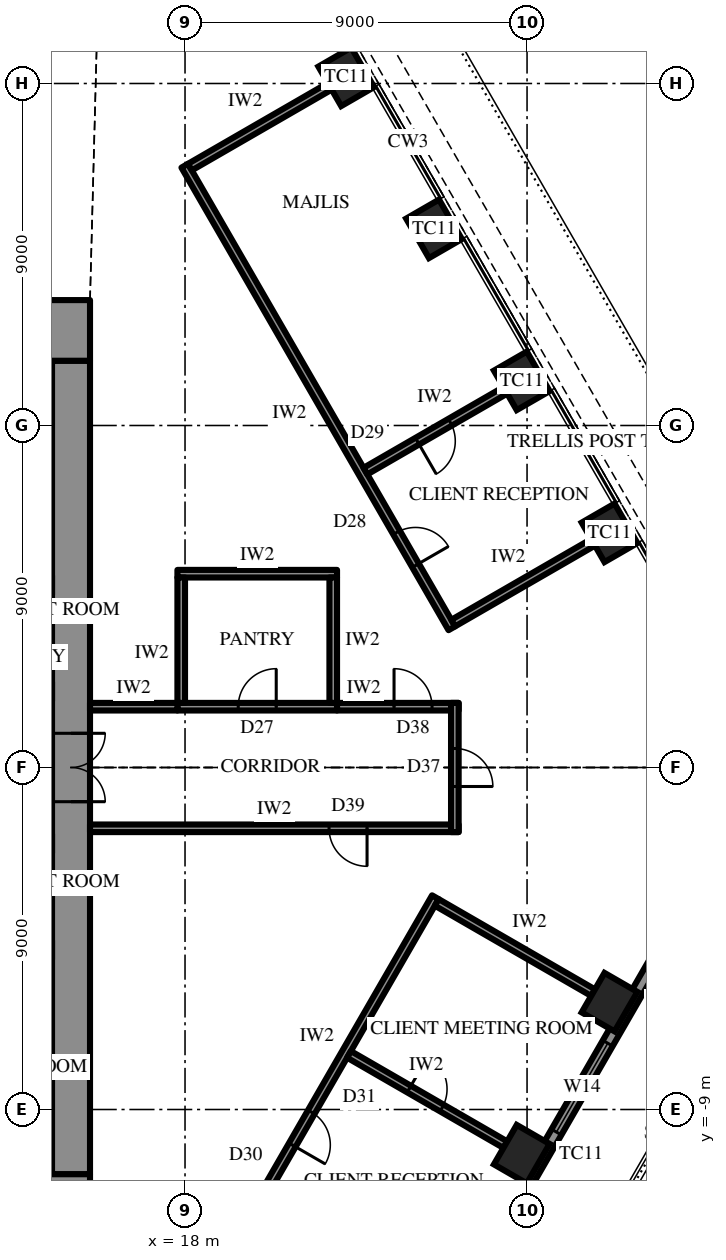
"""IFC4 building model, lengths in metres.
Left out: names, types, materials, properties, quantities, classifications, styles, units other than length and angle.
Written with IfcOpenShell. Run it as: python <this file> out.ifc"""

import sys

from ifc_helpers import new_model, si_unit, direction, frame, frame_2d, origin, origin_2d, place, context, subcontext, project, spatial, rectangle, extrude, element, fill, save


model = new_model("IFC4")
c1 = context("Model", 3, precision=1e-05, world=origin(), true_north=direction((0.0, 1.0)))
c2 = subcontext(c1, "Body", "Model", "MODEL_VIEW")
j1 = project(units=[si_unit("LENGTHUNIT", "METRE"), si_unit("PLANEANGLEUNIT", "RADIAN")], contexts=[c1])
p1 = place(None, origin())
s1 = spatial("IfcSite", under=j1, at=p1, CompositionType="ELEMENT")
p2 = place(p1, origin())
s2 = spatial("IfcBuilding", under=s1, at=p2, CompositionType="ELEMENT")
p3 = place(p2, frame((0.0, 0.0, 265.9)))
s3 = spatial("IfcBuildingStorey", under=s2, at=p3, CompositionType="ELEMENT", Elevation=265.9)
for number, where, z_axis, x_axis in (
    (1, (29.171, 6.175, 0.0), (0.0, 0.0, 1.0), (-0.5, 0.866, 0.0)),
    (2, (26.861, 10.175, 0.0), (0.0, 0.0, 1.0), (-0.5, 0.866, 0.0)),
    (3, (24.552, 14.175, 0.0), (0.0, 0.0, 1.0), (-0.5, 0.866, 0.0)),
    (4, (22.242, 18.175, 0.0), (0.0, 0.0, 1.0), (-0.5, 0.866, 0.0)),
    (5, (26.861, -10.175, 0.0), (0.0, 0.0, 1.0), (0.5, 0.866, 0.0)),
    (6, (29.171, -6.175, 0.0), (0.0, 0.0, 1.0), (0.5, 0.866, 0.0)),
):
    element("IfcColumn", number, at=place(p3, frame(where, z_axis=z_axis, x_axis=x_axis)), inside=s3, PredefinedType="COLUMN", context=c2, shape_type="SweptSolid", body=[
        extrude(rectangle(XDim=1.2, YDim=1.0, at=origin_2d()), origin(), (0.0, 0.0, 1.0), 4.2),
    ])
p4 = place(p3, frame((-15.5, 11.5, 0.0), z_axis=(0.0, 0.0, 1.0), x_axis=(1.0, 0.0, 0.0)))
e7 = element("IfcWall", 7, at=p4, inside=s3, PredefinedType="SHEAR", context=c2, shape_type="SweptSolid", body=[
    extrude(rectangle(XDim=31.0, YDim=1.6, at=frame_2d((15.5, 0.0))), origin(), (0.0, 0.0, 1.0), 4.2),
])
p5 = place(p4, frame((16.35, 0.0, 0.0)))
e8 = element("IfcOpeningElement", 8, at=p5, cuts=e7, PredefinedType="OPENING", context=c2, shape_type="SweptSolid", body=[
    extrude(rectangle(XDim=0.9, YDim=2.2, at=frame_2d((0.45, 1.1))), frame((0.0, 0.81, 0.0), z_axis=(0.0, -1.0, 0.0), x_axis=(1.0, 0.0, 0.0)), (0.0, 0.0, 1.0), 1.62),
])
p6 = place(p4, frame((19.35, 0.0, 0.0)))
e9 = element("IfcOpeningElement", 9, at=p6, cuts=e7, PredefinedType="OPENING", context=c2, shape_type="SweptSolid", body=[
    extrude(rectangle(XDim=0.9, YDim=2.2, at=frame_2d((0.45, 1.1))), frame((0.0, 0.81, 0.0), z_axis=(0.0, -1.0, 0.0), x_axis=(1.0, 0.0, 0.0)), (0.0, 0.0, 1.0), 1.62),
])
p7 = place(p4, frame((22.4, 0.0, 0.0)))
e10 = element("IfcOpeningElement", 10, at=p7, cuts=e7, PredefinedType="OPENING", context=c2, shape_type="SweptSolid", body=[
    extrude(rectangle(XDim=1.0, YDim=2.2, at=frame_2d((0.5, 1.1))), frame((0.0, 0.81, 0.0), z_axis=(0.0, -1.0, 0.0), x_axis=(1.0, 0.0, 0.0)), (0.0, 0.0, 1.0), 1.62),
])
p8 = place(p4, frame((1.65, 0.0, 0.0)))
e11 = element("IfcOpeningElement", 11, at=p8, cuts=e7, PredefinedType="OPENING", context=c2, shape_type="SweptSolid", body=[
    extrude(rectangle(XDim=0.9, YDim=2.2, at=frame_2d((0.45, 1.1))), frame((0.0, 0.81, 0.0), z_axis=(0.0, -1.0, 0.0), x_axis=(1.0, 0.0, 0.0)), (0.0, 0.0, 1.0), 1.62),
])
p9 = place(p4, frame((4.65, 0.0, 0.0)))
e12 = element("IfcOpeningElement", 12, at=p9, cuts=e7, PredefinedType="OPENING", context=c2, shape_type="SweptSolid", body=[
    extrude(rectangle(XDim=0.9, YDim=2.2, at=frame_2d((0.45, 1.1))), frame((0.0, 0.81, 0.0), z_axis=(0.0, -1.0, 0.0), x_axis=(1.0, 0.0, 0.0)), (0.0, 0.0, 1.0), 1.62),
])
p10 = place(p4, frame((25.45, 0.0, 0.0)))
e13 = element("IfcOpeningElement", 13, at=p10, cuts=e7, PredefinedType="OPENING", context=c2, shape_type="SweptSolid", body=[
    extrude(rectangle(XDim=0.9, YDim=2.2, at=frame_2d((0.45, 1.1))), frame((0.0, 0.81, 0.0), z_axis=(0.0, -1.0, 0.0), x_axis=(1.0, 0.0, 0.0)), (0.0, 0.0, 1.0), 1.62),
])
p11 = place(p4, frame((28.45, 0.0, 0.0)))
e14 = element("IfcOpeningElement", 14, at=p11, cuts=e7, PredefinedType="OPENING", context=c2, shape_type="SweptSolid", body=[
    extrude(rectangle(XDim=0.9, YDim=2.2, at=frame_2d((0.45, 1.1))), frame((0.0, 0.81, 0.0), z_axis=(0.0, -1.0, 0.0), x_axis=(1.0, 0.0, 0.0)), (0.0, 0.0, 1.0), 1.62),
])
p12 = place(p3, frame((15.5, -11.5, 0.0), z_axis=(0.0, 0.0, 1.0), x_axis=(-1.0, 0.0, 0.0)))
e15 = element("IfcWall", 15, at=p12, inside=s3, PredefinedType="SHEAR", context=c2, shape_type="SweptSolid", body=[
    extrude(rectangle(XDim=31.0, YDim=1.6, at=frame_2d((15.5, 0.0))), origin(), (0.0, 0.0, 1.0), 4.2),
])
p13 = place(p12, frame((16.35, 0.0, 0.0)))
e16 = element("IfcOpeningElement", 16, at=p13, cuts=e15, PredefinedType="OPENING", context=c2, shape_type="SweptSolid", body=[
    extrude(rectangle(XDim=0.9, YDim=2.2, at=frame_2d((0.45, 1.1))), frame((0.0, 0.81, 0.0), z_axis=(0.0, -1.0, 0.0), x_axis=(1.0, 0.0, 0.0)), (0.0, 0.0, 1.0), 1.62),
])
p14 = place(p12, frame((19.35, 0.0, 0.0)))
e17 = element("IfcOpeningElement", 17, at=p14, cuts=e15, PredefinedType="OPENING", context=c2, shape_type="SweptSolid", body=[
    extrude(rectangle(XDim=0.9, YDim=2.2, at=frame_2d((0.45, 1.1))), frame((0.0, 0.81, 0.0), z_axis=(0.0, -1.0, 0.0), x_axis=(1.0, 0.0, 0.0)), (0.0, 0.0, 1.0), 1.62),
])
p15 = place(p12, frame((22.4, 0.0, 0.0)))
e18 = element("IfcOpeningElement", 18, at=p15, cuts=e15, PredefinedType="OPENING", context=c2, shape_type="SweptSolid", body=[
    extrude(rectangle(XDim=1.0, YDim=2.2, at=frame_2d((0.5, 1.1))), frame((0.0, 0.81, 0.0), z_axis=(0.0, -1.0, 0.0), x_axis=(1.0, 0.0, 0.0)), (0.0, 0.0, 1.0), 1.62),
])
p16 = place(p12, frame((1.65, 0.0, 0.0)))
e19 = element("IfcOpeningElement", 19, at=p16, cuts=e15, PredefinedType="OPENING", context=c2, shape_type="SweptSolid", body=[
    extrude(rectangle(XDim=0.9, YDim=2.2, at=frame_2d((0.45, 1.1))), frame((0.0, 0.81, 0.0), z_axis=(0.0, -1.0, 0.0), x_axis=(1.0, 0.0, 0.0)), (0.0, 0.0, 1.0), 1.62),
])
p17 = place(p12, frame((4.65, 0.0, 0.0)))
e20 = element("IfcOpeningElement", 20, at=p17, cuts=e15, PredefinedType="OPENING", context=c2, shape_type="SweptSolid", body=[
    extrude(rectangle(XDim=0.9, YDim=2.2, at=frame_2d((0.45, 1.1))), frame((0.0, 0.81, 0.0), z_axis=(0.0, -1.0, 0.0), x_axis=(1.0, 0.0, 0.0)), (0.0, 0.0, 1.0), 1.62),
])
p18 = place(p12, frame((25.45, 0.0, 0.0)))
e21 = element("IfcOpeningElement", 21, at=p18, cuts=e15, PredefinedType="OPENING", context=c2, shape_type="SweptSolid", body=[
    extrude(rectangle(XDim=0.9, YDim=2.2, at=frame_2d((0.45, 1.1))), frame((0.0, 0.81, 0.0), z_axis=(0.0, -1.0, 0.0), x_axis=(1.0, 0.0, 0.0)), (0.0, 0.0, 1.0), 1.62),
])
p19 = place(p12, frame((28.45, 0.0, 0.0)))
e22 = element("IfcOpeningElement", 22, at=p19, cuts=e15, PredefinedType="OPENING", context=c2, shape_type="SweptSolid", body=[
    extrude(rectangle(XDim=0.9, YDim=2.2, at=frame_2d((0.45, 1.1))), frame((0.0, 0.81, 0.0), z_axis=(0.0, -1.0, 0.0), x_axis=(1.0, 0.0, 0.0)), (0.0, 0.0, 1.0), 1.62),
])
p20 = place(p3, frame((15.0, -10.7, 0.0), z_axis=(0.0, 0.0, 1.0), x_axis=(0.0, 1.0, 0.0)))
e23 = element("IfcWall", 23, at=p20, inside=s3, PredefinedType="SHEAR", context=c2, shape_type="SweptSolid", body=[
    extrude(rectangle(XDim=21.4, YDim=1.0, at=frame_2d((10.7, 0.0))), origin(), (0.0, 0.0, 1.0), 4.2),
])
p21 = place(p20, frame((9.8, 0.0, 0.0)))
e24 = element("IfcOpeningElement", 24, at=p21, cuts=e23, PredefinedType="OPENING", context=c2, shape_type="SweptSolid", body=[
    extrude(rectangle(XDim=1.8, YDim=2.4, at=frame_2d((0.9, 1.2))), frame((0.0, 0.51, 0.0), z_axis=(0.0, -1.0, 0.0), x_axis=(1.0, 0.0, 0.0)), (0.0, 0.0, 1.0), 1.02),
])
p22 = place(p3, frame((12.3, 2.0, 0.0), z_axis=(0.0, 0.0, 1.0), x_axis=(1.0, 0.0, 0.0)))
e25 = element("IfcWall", 25, at=p22, inside=s3, PredefinedType="SHEAR", context=c2, shape_type="SweptSolid", body=[
    extrude(rectangle(XDim=2.2, YDim=0.5, at=frame_2d((1.1, 0.0))), origin(), (0.0, 0.0, 1.0), 4.2),
])
p23 = place(p22, frame((0.8, 0.0, 0.0)))
e26 = element("IfcOpeningElement", 26, at=p23, cuts=e25, PredefinedType="OPENING", context=c2, shape_type="SweptSolid", body=[
    extrude(rectangle(XDim=0.9, YDim=2.2, at=frame_2d((0.45, 1.1))), frame((0.0, 0.26, 0.0), z_axis=(0.0, -1.0, 0.0), x_axis=(1.0, 0.0, 0.0)), (0.0, 0.0, 1.0), 0.52),
])
p24 = place(p3, frame((12.3, 4.8, 0.0), z_axis=(0.0, 0.0, 1.0), x_axis=(1.0, 0.0, 0.0)))
e27 = element("IfcWall", 27, at=p24, inside=s3, PredefinedType="SHEAR", context=c2, shape_type="SweptSolid", body=[
    extrude(rectangle(XDim=2.2, YDim=0.5, at=frame_2d((1.1, 0.0))), origin(), (0.0, 0.0, 1.0), 4.2),
])
p25 = place(p3, frame((18.707, -25.299, 0.0), z_axis=(0.0, 0.0, 1.0), x_axis=(0.500000442367, 0.866025148383, 0.0)))
e28 = element("IfcWall", 28, at=p25, inside=s3, PredefinedType="SOLIDWALL", context=c2, shape_type="SweptSolid", body=[
    extrude(rectangle(XDim=25.113, YDim=0.3, at=frame_2d((12.556, 0.0))), origin(), (0.0, 0.0, 1.0), 2.8),
])
p26 = place(p25, frame((4.278, 0.0, 0.6)))
e29 = element("IfcOpeningElement", 29, at=p26, cuts=e28, PredefinedType="OPENING", context=c2, shape_type="SweptSolid", body=[
    extrude(rectangle(XDim=2.7, YDim=1.95, at=frame_2d((1.35, 0.975))), frame((0.0, 0.16, 0.0), z_axis=(0.0, -1.0, 0.0), x_axis=(1.0, 0.0, 0.0)), (0.0, 0.0, 1.0), 0.32),
])
p27 = place(p25, frame((9.647, 0.0, 0.0)))
e30 = element("IfcOpeningElement", 30, at=p27, cuts=e28, PredefinedType="OPENING", context=c2, shape_type="SweptSolid", body=[
    extrude(rectangle(XDim=1.2, YDim=2.4, at=frame_2d((0.6, 1.2))), frame((0.0, 0.16, 0.0), z_axis=(0.0, -1.0, 0.0), x_axis=(1.0, 0.0, 0.0)), (0.0, 0.0, 1.0), 0.32),
])
p28 = place(p25, frame((13.516, 0.0, 0.6)))
e31 = element("IfcOpeningElement", 31, at=p28, cuts=e28, PredefinedType="OPENING", context=c2, shape_type="SweptSolid", body=[
    extrude(rectangle(XDim=2.7, YDim=1.95, at=frame_2d((1.35, 0.975))), frame((0.0, 0.16, 0.0), z_axis=(0.0, -1.0, 0.0), x_axis=(1.0, 0.0, 0.0)), (0.0, 0.0, 1.0), 0.32),
])
p29 = place(p25, frame((18.135, 0.0, 0.6)))
e32 = element("IfcOpeningElement", 32, at=p29, cuts=e28, PredefinedType="OPENING", context=c2, shape_type="SweptSolid", body=[
    extrude(rectangle(XDim=2.7, YDim=1.95, at=frame_2d((1.35, 0.975))), frame((0.0, 0.16, 0.0), z_axis=(0.0, -1.0, 0.0), x_axis=(1.0, 0.0, 0.0)), (0.0, 0.0, 1.0), 0.32),
])
p30 = place(p3, frame((25.021, 3.663, 0.0), z_axis=(0.0, 0.0, 1.0), x_axis=(-0.500002095642, 0.866024193862, 0.0)))
e33 = element("IfcWall", 33, at=p30, inside=s3, PredefinedType="PARTITIONING", context=c2, shape_type="SweptSolid", body=[
    extrude(rectangle(XDim=14.057, YDim=0.2, at=frame_2d((7.028, 0.0))), origin(), (0.0, 0.0, 1.0), 4.0),
])
p31 = place(p30, frame((1.909, 0.0, 0.0)))
e34 = element("IfcOpeningElement", 34, at=p31, cuts=e33, PredefinedType="OPENING", context=c2, shape_type="SweptSolid", body=[
    extrude(rectangle(XDim=1.0, YDim=2.2, at=frame_2d((0.5, 1.1))), frame((0.0, 0.11, 0.0), z_axis=(0.0, -1.0, 0.0), x_axis=(1.0, 0.0, 0.0)), (0.0, 0.0, 1.0), 0.22),
])
p32 = place(p3, frame((25.057, 3.8, 0.0), z_axis=(0.0, 0.0, 1.0), x_axis=(0.866028703517, 0.499994284652, 0.0)))
e35 = element("IfcWall", 35, at=p32, inside=s3, PredefinedType="PARTITIONING", context=c2, shape_type="SweptSolid", body=[
    extrude(rectangle(XDim=4.25, YDim=0.2, at=frame_2d((2.125, 0.0))), origin(), (0.0, 0.0, 1.0), 3.082),
])
p33 = place(p3, frame((22.748, 7.8, 0.0), z_axis=(0.0, 0.0, 1.0), x_axis=(0.866028703517, 0.499994284652, 0.0)))
e36 = element("IfcWall", 36, at=p33, inside=s3, PredefinedType="PARTITIONING", context=c2, shape_type="SweptSolid", body=[
    extrude(rectangle(XDim=4.25, YDim=0.2, at=frame_2d((2.125, 0.0))), origin(), (0.0, 0.0, 1.0), 3.082),
])
p34 = place(p33, frame((1.575, 0.0, 0.0)))
e37 = element("IfcOpeningElement", 37, at=p34, cuts=e36, PredefinedType="OPENING", context=c2, shape_type="SweptSolid", body=[
    extrude(rectangle(XDim=1.0, YDim=2.2, at=frame_2d((0.5, 1.1))), frame((0.0, 0.11, 0.0), z_axis=(0.0, -1.0, 0.0), x_axis=(1.0, 0.0, 0.0)), (0.0, 0.0, 1.0), 0.22),
])
p35 = place(p3, frame((18.129, 15.8, 0.0), z_axis=(0.0, 0.0, 1.0), x_axis=(0.866014341725, 0.50001915956, 0.0)))
e38 = element("IfcWall", 38, at=p35, inside=s3, PredefinedType="PARTITIONING", context=c2, shape_type="SweptSolid", body=[
    extrude(rectangle(XDim=4.25, YDim=0.2, at=frame_2d((2.125, 0.0))), origin(), (0.0, 0.0, 1.0), 3.082),
])
p36 = place(p3, frame((19.869, -11.587, 0.0), z_axis=(0.0, 0.0, 1.0), x_axis=(0.499989672313, 0.866031366395, 0.0)))
e39 = element("IfcWall", 39, at=p36, inside=s3, PredefinedType="PARTITIONING", context=c2, shape_type="SweptSolid", body=[
    extrude(rectangle(XDim=9.438, YDim=0.2, at=frame_2d((4.719, 0.0))), origin(), (0.0, 0.0, 1.0), 4.0),
])
p37 = place(p36, frame((1.909, 0.0, 0.0)))
e40 = element("IfcOpeningElement", 40, at=p37, cuts=e39, PredefinedType="OPENING", context=c2, shape_type="SweptSolid", body=[
    extrude(rectangle(XDim=1.0, YDim=2.2, at=frame_2d((0.5, 1.1))), frame((0.0, 0.11, 0.0), z_axis=(0.0, -1.0, 0.0), x_axis=(1.0, 0.0, 0.0)), (0.0, 0.0, 1.0), 0.22),
])
p38 = place(p3, frame((22.315, -7.55, 0.0), z_axis=(0.0, 0.0, 1.0), x_axis=(0.866020389056, -0.500008685663, 0.0)))
e41 = element("IfcWall", 41, at=p38, inside=s3, PredefinedType="PARTITIONING", context=c2, shape_type="SweptSolid", body=[
    extrude(rectangle(XDim=4.75, YDim=0.2, at=frame_2d((2.375, 0.0))), origin(), (0.0, 0.0, 1.0), 3.082),
])
p39 = place(p38, frame((1.825, 0.0, 0.0)))
e42 = element("IfcOpeningElement", 42, at=p39, cuts=e41, PredefinedType="OPENING", context=c2, shape_type="SweptSolid", body=[
    extrude(rectangle(XDim=1.0, YDim=2.2, at=frame_2d((0.5, 1.1))), frame((0.0, 0.11, 0.0), z_axis=(0.0, -1.0, 0.0), x_axis=(1.0, 0.0, 0.0)), (0.0, 0.0, 1.0), 0.22),
])
p40 = place(p3, frame((24.624, -3.55, 0.0), z_axis=(0.0, 0.0, 1.0), x_axis=(0.866020389056, -0.500008685663, 0.0)))
e43 = element("IfcWall", 43, at=p40, inside=s3, PredefinedType="PARTITIONING", context=c2, shape_type="SweptSolid", body=[
    extrude(rectangle(XDim=4.75, YDim=0.2, at=frame_2d((2.375, 0.0))), origin(), (0.0, 0.0, 1.0), 3.082),
])
p41 = place(p3, frame((17.8, 1.6, 0.0), z_axis=(0.0, 0.0, 1.0), x_axis=(1.0, 0.0, 0.0)))
e44 = element("IfcWall", 44, at=p41, inside=s3, PredefinedType="PARTITIONING", context=c2, shape_type="SweptSolid", body=[
    extrude(rectangle(XDim=4.2, YDim=0.2, at=frame_2d((2.1, 0.0))), origin(), (0.0, 0.0, 1.0), 4.0),
])
p42 = place(p41, frame((1.6, 0.0, 0.0)))
e45 = element("IfcOpeningElement", 45, at=p42, cuts=e44, PredefinedType="OPENING", context=c2, shape_type="SweptSolid", body=[
    extrude(rectangle(XDim=1.0, YDim=2.2, at=frame_2d((0.5, 1.1))), frame((0.0, 0.11, 0.0), z_axis=(0.0, -1.0, 0.0), x_axis=(1.0, 0.0, 0.0)), (0.0, 0.0, 1.0), 0.22),
])
p43 = place(p3, frame((17.8, 5.1, 0.0), z_axis=(0.0, 0.0, 1.0), x_axis=(1.0, 0.0, 0.0)))
e46 = element("IfcWall", 46, at=p43, inside=s3, PredefinedType="PARTITIONING", context=c2, shape_type="SweptSolid", body=[
    extrude(rectangle(XDim=4.2, YDim=0.2, at=frame_2d((2.1, 0.0))), origin(), (0.0, 0.0, 1.0), 4.0),
])
for number, where, z_axis, x_axis in (
    (47, (17.9, 1.7, 0.0), (0.0, 0.0, 1.0), (0.0, 1.0, 0.0)),
    (48, (21.9, 1.7, 0.0), (0.0, 0.0, 1.0), (0.0, 1.0, 0.0)),
):
    element("IfcWall", number, at=place(p3, frame(where, z_axis=z_axis, x_axis=x_axis)), inside=s3, PredefinedType="PARTITIONING", context=c2, shape_type="SweptSolid", body=[
        extrude(rectangle(XDim=3.3, YDim=0.2, at=frame_2d((1.65, 0.0))), origin(), (0.0, 0.0, 1.0), 4.0),
    ])
p44 = place(p3, frame((15.5, 1.6, 0.0), z_axis=(0.0, 0.0, 1.0), x_axis=(1.0, 0.0, 0.0)))
e49 = element("IfcWall", 49, at=p44, inside=s3, PredefinedType="PARTITIONING", context=c2, shape_type="SweptSolid", body=[
    extrude(rectangle(XDim=2.3, YDim=0.2, at=frame_2d((1.15, 0.0))), origin(), (0.0, 0.0, 1.0), 4.0),
])
p45 = place(p3, frame((22.0, 1.6, 0.0), z_axis=(0.0, 0.0, 1.0), x_axis=(1.0, 0.0, 0.0)))
e50 = element("IfcWall", 50, at=p45, inside=s3, PredefinedType="PARTITIONING", context=c2, shape_type="SweptSolid", body=[
    extrude(rectangle(XDim=3.2, YDim=0.2, at=frame_2d((1.6, 0.0))), origin(), (0.0, 0.0, 1.0), 4.0),
])
p46 = place(p45, frame((1.5, 0.0, 0.0)))
e51 = element("IfcOpeningElement", 51, at=p46, cuts=e50, PredefinedType="OPENING", context=c2, shape_type="SweptSolid", body=[
    extrude(rectangle(XDim=1.0, YDim=2.2, at=frame_2d((0.5, 1.1))), frame((0.0, 0.11, 0.0), z_axis=(0.0, -1.0, 0.0), x_axis=(1.0, 0.0, 0.0)), (0.0, 0.0, 1.0), 0.22),
])
p47 = place(p3, frame((15.5, -1.6, 0.0), z_axis=(0.0, 0.0, 1.0), x_axis=(1.0, 0.0, 0.0)))
e52 = element("IfcWall", 52, at=p47, inside=s3, PredefinedType="PARTITIONING", context=c2, shape_type="SweptSolid", body=[
    extrude(rectangle(XDim=9.7, YDim=0.2, at=frame_2d((4.85, 0.0))), origin(), (0.0, 0.0, 1.0), 4.0),
])
p48 = place(p47, frame((6.29, 0.0, 0.0)))
e53 = element("IfcOpeningElement", 53, at=p48, cuts=e52, PredefinedType="OPENING", context=c2, shape_type="SweptSolid", body=[
    extrude(rectangle(XDim=1.0, YDim=2.2, at=frame_2d((0.5, 1.1))), frame((0.0, 0.11, 0.0), z_axis=(0.0, -1.0, 0.0), x_axis=(1.0, 0.0, 0.0)), (0.0, 0.0, 1.0), 0.22),
])
p49 = place(p3, frame((25.1, -1.7, 0.0), z_axis=(0.0, 0.0, 1.0), x_axis=(0.0, 1.0, 0.0)))
e54 = element("IfcWall", 54, at=p49, inside=s3, PredefinedType="PARTITIONING", context=c2, shape_type="SweptSolid", body=[
    extrude(rectangle(XDim=3.4, YDim=0.2, at=frame_2d((1.7, 0.0))), origin(), (0.0, 0.0, 1.0), 4.0),
])
p50 = place(p49, frame((1.2, 0.0, 0.0)))
e55 = element("IfcOpeningElement", 55, at=p50, cuts=e54, PredefinedType="OPENING", context=c2, shape_type="SweptSolid", body=[
    extrude(rectangle(XDim=1.0, YDim=2.2, at=frame_2d((0.5, 1.1))), frame((0.0, 0.11, 0.0), z_axis=(0.0, -1.0, 0.0), x_axis=(1.0, 0.0, 0.0)), (0.0, 0.0, 1.0), 0.22),
])
p51 = place(p29, origin())
e56 = element("IfcWindow", 56, at=p51, inside=s3, PartitioningType="SINGLE_PANEL", PredefinedType="WINDOW", context=c2, shape_type="SweptSolid", body=[
    extrude(rectangle(XDim=2.7, YDim=1.95, at=frame_2d((1.35, 0.975))), frame((0.0, 0.03, 0.0), z_axis=(0.0, -1.0, 0.0), x_axis=(1.0, 0.0, 0.0)), (0.0, 0.0, 1.0), 0.06),
])
fill(e32, e56)
p52 = place(p21, frame((1.8, 0.0, 0.0), z_axis=(0.0, 0.0, 1.0), x_axis=(-1.0, 0.0, 0.0)))
e57 = element("IfcDoor", 57, at=p52, inside=s3, OperationType="DOUBLE_DOOR_SINGLE_SWING", PredefinedType="DOOR", context=c2, shape_type="SweptSolid", body=[
    extrude(rectangle(XDim=1.8, YDim=2.4, at=frame_2d((0.9, 1.2))), frame((0.0, 0.025, 0.0), z_axis=(0.0, -1.0, 0.0), x_axis=(1.0, 0.0, 0.0)), (0.0, 0.0, 1.0), 0.05),
])
fill(e24, e57)
p53 = place(p31, frame((1.0, 0.0, 0.0), z_axis=(0.0, 0.0, 1.0), x_axis=(-1.0, 0.0, 0.0)))
e58 = element("IfcDoor", 58, at=p53, inside=s3, OperationType="SINGLE_SWING_LEFT", PredefinedType="DOOR", context=c2, shape_type="SweptSolid", body=[
    extrude(rectangle(XDim=1.0, YDim=2.2, at=frame_2d((0.5, 1.1))), frame((0.0, 0.025, 0.0), z_axis=(0.0, -1.0, 0.0), x_axis=(1.0, 0.0, 0.0)), (0.0, 0.0, 1.0), 0.05),
])
fill(e34, e58)
p54 = place(p34, frame((1.0, 0.0, 0.0), z_axis=(0.0, 0.0, 1.0), x_axis=(-1.0, 0.0, 0.0)))
e59 = element("IfcDoor", 59, at=p54, inside=s3, OperationType="SINGLE_SWING_LEFT", PredefinedType="DOOR", context=c2, shape_type="SweptSolid", body=[
    extrude(rectangle(XDim=1.0, YDim=2.2, at=frame_2d((0.5, 1.1))), frame((0.0, 0.025, 0.0), z_axis=(0.0, -1.0, 0.0), x_axis=(1.0, 0.0, 0.0)), (0.0, 0.0, 1.0), 0.05),
])
fill(e37, e59)
p55 = place(p37, frame((1.0, 0.0, 0.0), z_axis=(0.0, 0.0, 1.0), x_axis=(-1.0, 0.0, 0.0)))
e60 = element("IfcDoor", 60, at=p55, inside=s3, OperationType="SINGLE_SWING_LEFT", PredefinedType="DOOR", context=c2, shape_type="SweptSolid", body=[
    extrude(rectangle(XDim=1.0, YDim=2.2, at=frame_2d((0.5, 1.1))), frame((0.0, 0.025, 0.0), z_axis=(0.0, -1.0, 0.0), x_axis=(1.0, 0.0, 0.0)), (0.0, 0.0, 1.0), 0.05),
])
fill(e40, e60)
p56 = place(p39, origin())
e61 = element("IfcDoor", 61, at=p56, inside=s3, OperationType="SINGLE_SWING_RIGHT", PredefinedType="DOOR", context=c2, shape_type="SweptSolid", body=[
    extrude(rectangle(XDim=1.0, YDim=2.2, at=frame_2d((0.5, 1.1))), frame((0.0, 0.025, 0.0), z_axis=(0.0, -1.0, 0.0), x_axis=(1.0, 0.0, 0.0)), (0.0, 0.0, 1.0), 0.05),
])
fill(e42, e61)
p57 = place(p42, origin())
e62 = element("IfcDoor", 62, at=p57, inside=s3, OperationType="SINGLE_SWING_LEFT", PredefinedType="DOOR", context=c2, shape_type="SweptSolid", body=[
    extrude(rectangle(XDim=1.0, YDim=2.2, at=frame_2d((0.5, 1.1))), frame((0.0, 0.025, 0.0), z_axis=(0.0, -1.0, 0.0), x_axis=(1.0, 0.0, 0.0)), (0.0, 0.0, 1.0), 0.05),
])
fill(e45, e62)
p58 = place(p46, origin())
e63 = element("IfcDoor", 63, at=p58, inside=s3, OperationType="SINGLE_SWING_RIGHT", PredefinedType="DOOR", context=c2, shape_type="SweptSolid", body=[
    extrude(rectangle(XDim=1.0, YDim=2.2, at=frame_2d((0.5, 1.1))), frame((0.0, 0.025, 0.0), z_axis=(0.0, -1.0, 0.0), x_axis=(1.0, 0.0, 0.0)), (0.0, 0.0, 1.0), 0.05),
])
fill(e51, e63)
p59 = place(p48, frame((1.0, 0.0, 0.0), z_axis=(0.0, 0.0, 1.0), x_axis=(-1.0, 0.0, 0.0)))
e64 = element("IfcDoor", 64, at=p59, inside=s3, OperationType="SINGLE_SWING_RIGHT", PredefinedType="DOOR", context=c2, shape_type="SweptSolid", body=[
    extrude(rectangle(XDim=1.0, YDim=2.2, at=frame_2d((0.5, 1.1))), frame((0.0, 0.025, 0.0), z_axis=(0.0, -1.0, 0.0), x_axis=(1.0, 0.0, 0.0)), (0.0, 0.0, 1.0), 0.05),
])
fill(e53, e64)
p60 = place(p50, frame((1.0, 0.0, 0.0), z_axis=(0.0, 0.0, 1.0), x_axis=(-1.0, 0.0, 0.0)))
e65 = element("IfcDoor", 65, at=p60, inside=s3, OperationType="SINGLE_SWING_LEFT", PredefinedType="DOOR", context=c2, shape_type="SweptSolid", body=[
    extrude(rectangle(XDim=1.0, YDim=2.2, at=frame_2d((0.5, 1.1))), frame((0.0, 0.025, 0.0), z_axis=(0.0, -1.0, 0.0), x_axis=(1.0, 0.0, 0.0)), (0.0, 0.0, 1.0), 0.05),
])
fill(e55, e65)
save(model, sys.argv[1])
